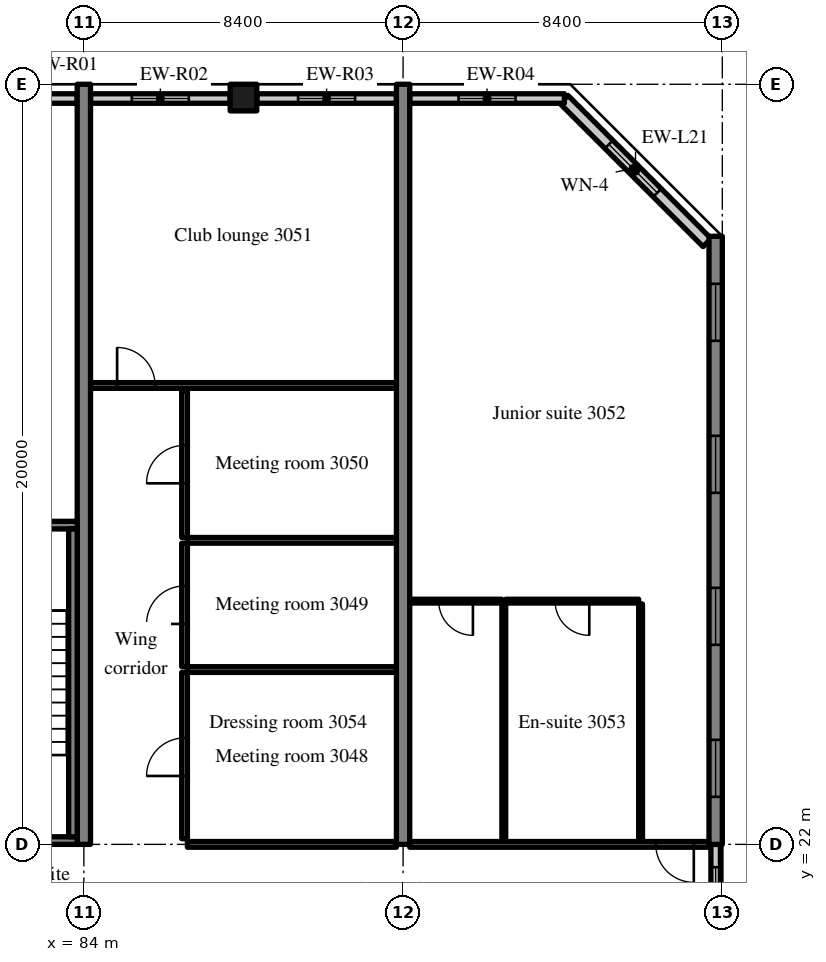
"""IFC4 building model, lengths in metres.
Left out: names, types, materials, properties, quantities, classifications, styles, units other than length and angle.
Written with IfcOpenShell. Run it as: python <this file> out.ifc"""

import sys

from ifc_helpers import new_model, si_unit, direction, frame, frame_2d, origin, origin_2d, place, context, subcontext, project, spatial, rectangle, extrude, source, transform, mapped, element, fill, save


model = new_model("IFC4")
c1 = context("Model", 3, precision=1e-05, world=origin(), true_north=direction((0.0, 1.0)))
c2 = subcontext(c1, "Body", "Model", "MODEL_VIEW")
j1 = project(units=[si_unit("LENGTHUNIT", "METRE"), si_unit("PLANEANGLEUNIT", "RADIAN")], contexts=[c1])
p1 = place(None, origin())
s1 = spatial("IfcSite", under=j1, at=p1, CompositionType="ELEMENT")
p2 = place(p1, origin())
s2 = spatial("IfcBuilding", under=s1, at=p2, CompositionType="ELEMENT")
p3 = place(p2, frame((0.0, 0.0, 125.6)))
s3 = spatial("IfcBuildingStorey", under=s2, at=p3, CompositionType="ELEMENT", Elevation=125.6)
m1 = source(origin(), c2, "Body", "SweptSolid", [
    extrude(rectangle(XDim=20.0, YDim=0.35, at=frame_2d((10.0, 0.0))), origin(), (0.0, 0.0, 1.0), 3.52),
])
for number, where, z_axis, x_axis in (
    (1, (84.0, 22.0, 0.0), (0.0, 0.0, 1.0), (0.0, 1.0, 0.0)),
    (2, (92.4, 22.0, 0.0), (0.0, 0.0, 1.0), (0.0, 1.0, 0.0)),
):
    element("IfcWall", number, at=place(p3, frame(where, z_axis=z_axis, x_axis=x_axis)), inside=s3, PredefinedType="SHEAR", context=c2, shape_type="MappedRepresentation", body=[
        mapped(m1, transform((0.0, 0.0, 0.0), scale=1.0)),
    ])
m2 = source(origin(), c2, "Body", "SweptSolid", [
    extrude(rectangle(XDim=16.0, YDim=0.35, at=frame_2d((8.0, 0.0))), origin(), (0.0, 0.0, 1.0), 3.52),
])
p4 = place(p3, frame((100.625, 22.0, 0.0), z_axis=(0.0, 0.0, 1.0), x_axis=(0.0, 1.0, 0.0)))
e3 = element("IfcWall", 3, at=p4, inside=s3, PredefinedType="SHEAR", context=c2, shape_type="MappedRepresentation", body=[
    mapped(m2, transform((0.0, 0.0, 0.0), scale=1.0)),
])
m3 = source(origin(), c2, "Body", "SweptSolid", [
    extrude(rectangle(XDim=1.5, YDim=1.5, at=frame_2d((0.75, 0.75))), frame((0.0, 0.185, 0.0), z_axis=(0.0, -1.0, 0.0), x_axis=(1.0, 0.0, 0.0)), (0.0, 0.0, 1.0), 0.37),
])
p5 = place(p4, frame((1.25, 0.0, 0.9)))
e4 = element("IfcOpeningElement", 4, at=p5, cuts=e3, PredefinedType="OPENING", context=c2, shape_type="MappedRepresentation", body=[
    mapped(m3, transform((0.0, 0.0, 0.0), scale=1.0)),
])
p6 = place(p4, frame((5.25, 0.0, 0.9)))
e5 = element("IfcOpeningElement", 5, at=p6, cuts=e3, PredefinedType="OPENING", context=c2, shape_type="MappedRepresentation", body=[
    mapped(m3, transform((0.0, 0.0, 0.0), scale=1.0)),
])
p7 = place(p4, frame((9.25, 0.0, 0.9)))
e6 = element("IfcOpeningElement", 6, at=p7, cuts=e3, PredefinedType="OPENING", context=c2, shape_type="MappedRepresentation", body=[
    mapped(m3, transform((0.0, 0.0, 0.0), scale=1.0)),
])
p8 = place(p4, frame((13.25, 0.0, 0.9)))
e7 = element("IfcOpeningElement", 7, at=p8, cuts=e3, PredefinedType="OPENING", context=c2, shape_type="MappedRepresentation", body=[
    mapped(m3, transform((0.0, 0.0, 0.0), scale=1.0)),
])
m4 = source(origin(), c2, "Body", "SweptSolid", [
    extrude(rectangle(XDim=0.7, YDim=0.7, at=origin_2d()), origin(), (0.0, 0.0, 1.0), 3.52),
])
p9 = place(p3, frame((88.2, 41.65, 0.0), z_axis=(0.0, 0.0, 1.0), x_axis=(1.0, 0.0, 0.0)))
e8 = element("IfcColumn", 8, at=p9, inside=s3, PredefinedType="COLUMN", context=c2, shape_type="MappedRepresentation", body=[
    mapped(m4, transform((0.0, 0.0, 0.0), scale=1.0)),
])
m5 = source(origin(), c2, "Body", "SweptSolid", [
    extrude(rectangle(XDim=5.326, YDim=0.3, at=frame_2d((2.663, 0.0))), origin(), (0.0, 0.0, 1.0), 3.52),
])
p10 = place(p3, frame((100.4, 37.834, 0.0), z_axis=(0.0, 0.0, 1.0), x_axis=(-0.707083859269, 0.707129702361, 0.0)))
e9 = element("IfcWall", 9, at=p10, inside=s3, PredefinedType="SOLIDWALL", context=c2, shape_type="MappedRepresentation", body=[
    mapped(m5, transform((0.0, 0.0, 0.0), scale=1.0)),
])
m6 = source(origin(), c2, "Body", "SweptSolid", [
    extrude(rectangle(XDim=1.8, YDim=1.5, at=frame_2d((0.9, 0.75))), frame((0.0, 0.16, 0.0), z_axis=(0.0, -1.0, 0.0), x_axis=(1.0, 0.0, 0.0)), (0.0, 0.0, 1.0), 0.32),
])
p11 = place(p10, frame((1.854, 0.0, 0.9)))
e10 = element("IfcOpeningElement", 10, at=p11, cuts=e9, PredefinedType="OPENING", context=c2, shape_type="MappedRepresentation", body=[
    mapped(m6, transform((0.0, 0.0, 0.0), scale=1.0)),
])
m7 = source(origin(), c2, "Body", "SweptSolid", [
    extrude(rectangle(XDim=1.683, YDim=0.25, at=frame_2d((0.841, 0.0))), origin(), (0.0, 0.0, 1.0), 2.82),
])
p12 = place(p3, frame((83.825, 41.625, 0.0), z_axis=(0.0, 0.0, 1.0), x_axis=(-1.0, 0.0, 0.0)))
e11 = element("IfcWall", 11, at=p12, inside=s3, PredefinedType="SOLIDWALL", context=c2, shape_type="MappedRepresentation", body=[
    mapped(m7, transform((0.0, 0.0, 0.0), scale=1.0)),
])
m8 = source(origin(), c2, "Body", "SweptSolid", [
    extrude(rectangle(XDim=3.675, YDim=0.25, at=frame_2d((1.837, 0.0))), origin(), (0.0, 0.0, 1.0), 2.82),
])
p13 = place(p3, frame((87.85, 41.625, 0.0), z_axis=(0.0, 0.0, 1.0), x_axis=(-1.0, 0.0, 0.0)))
e12 = element("IfcWall", 12, at=p13, inside=s3, PredefinedType="SOLIDWALL", context=c2, shape_type="MappedRepresentation", body=[
    mapped(m8, transform((0.0, 0.0, 0.0), scale=1.0)),
])
m9 = source(origin(), c2, "Body", "SweptSolid", [
    extrude(rectangle(XDim=1.5, YDim=1.5, at=frame_2d((0.75, 0.75))), frame((0.0, 0.135, 0.0), z_axis=(0.0, -1.0, 0.0), x_axis=(1.0, 0.0, 0.0)), (0.0, 0.0, 1.0), 0.27),
])
p14 = place(p13, frame((1.087, 0.0, 0.9)))
e13 = element("IfcOpeningElement", 13, at=p14, cuts=e12, PredefinedType="OPENING", context=c2, shape_type="MappedRepresentation", body=[
    mapped(m9, transform((0.0, 0.0, 0.0), scale=1.0)),
])
p15 = place(p3, frame((92.225, 41.625, 0.0), z_axis=(0.0, 0.0, 1.0), x_axis=(-1.0, 0.0, 0.0)))
e14 = element("IfcWall", 14, at=p15, inside=s3, PredefinedType="SOLIDWALL", context=c2, shape_type="MappedRepresentation", body=[
    mapped(m8, transform((0.0, 0.0, 0.0), scale=1.0)),
])
p16 = place(p15, frame((1.087, 0.0, 0.9)))
e15 = element("IfcOpeningElement", 15, at=p16, cuts=e14, PredefinedType="OPENING", context=c2, shape_type="MappedRepresentation", body=[
    mapped(m9, transform((0.0, 0.0, 0.0), scale=1.0)),
])
m10 = source(origin(), c2, "Body", "SweptSolid", [
    extrude(rectangle(XDim=4.07, YDim=0.25, at=frame_2d((2.035, 0.0))), origin(), (0.0, 0.0, 1.0), 2.82),
])
p17 = place(p3, frame((96.645, 41.625, 0.0), z_axis=(0.0, 0.0, 1.0), x_axis=(-1.0, 0.0, 0.0)))
e16 = element("IfcWall", 16, at=p17, inside=s3, PredefinedType="SOLIDWALL", context=c2, shape_type="MappedRepresentation", body=[
    mapped(m10, transform((0.0, 0.0, 0.0), scale=1.0)),
])
p18 = place(p17, frame((1.285, 0.0, 0.9)))
e17 = element("IfcOpeningElement", 17, at=p18, cuts=e16, PredefinedType="OPENING", context=c2, shape_type="MappedRepresentation", body=[
    mapped(m9, transform((0.0, 0.0, 0.0), scale=1.0)),
])
m11 = source(origin(), c2, "Body", "SweptSolid", [
    extrude(rectangle(XDim=2.4, YDim=0.25, at=frame_2d((1.2, 0.0))), origin(), (0.0, 0.0, 1.0), 2.62),
])
p19 = place(p3, frame((100.625, 19.6, 0.0), z_axis=(0.0, 0.0, 1.0), x_axis=(0.0, 1.0, 0.0)))
e18 = element("IfcWall", 18, at=p19, inside=s3, PredefinedType="SOLIDWALL", context=c2, shape_type="MappedRepresentation", body=[
    mapped(m11, transform((0.0, 0.0, 0.0), scale=1.0)),
])
m12 = source(origin(), c2, "Body", "SweptSolid", [
    extrude(rectangle(XDim=1.2, YDim=1.5, at=frame_2d((0.6, 0.75))), frame((0.0, 0.135, 0.0), z_axis=(0.0, -1.0, 0.0), x_axis=(1.0, 0.0, 0.0)), (0.0, 0.0, 1.0), 0.27),
])
p20 = place(p19, frame((0.6, 0.0, 0.9)))
e19 = element("IfcOpeningElement", 19, at=p20, cuts=e18, PredefinedType="OPENING", context=c2, shape_type="MappedRepresentation", body=[
    mapped(m12, transform((0.0, 0.0, 0.0), scale=1.0)),
])
m13 = source(origin(), c2, "Body", "SweptSolid", [
    extrude(rectangle(XDim=8.225, YDim=0.2, at=frame_2d((4.112, 0.0))), origin(), (0.0, 0.0, 1.0), 3.52),
])
p21 = place(p3, frame((83.825, 22.1, 0.0), z_axis=(0.0, 0.0, 1.0), x_axis=(-1.0, 0.0, 0.0)))
e20 = element("IfcWall", 20, at=p21, inside=s3, PredefinedType="SOLIDWALL", context=c2, shape_type="MappedRepresentation", body=[
    mapped(m13, transform((0.0, 0.0, 0.0), scale=1.0)),
])
m14 = source(origin(), c2, "Body", "SweptSolid", [
    extrude(rectangle(XDim=1.2, YDim=2.1, at=frame_2d((0.6, 1.05))), frame((0.0, 0.11, 0.0), z_axis=(0.0, -1.0, 0.0), x_axis=(1.0, 0.0, 0.0)), (0.0, 0.0, 1.0), 0.22),
])
p22 = place(p21, frame((6.025, 0.0, 0.0)))
e21 = element("IfcOpeningElement", 21, at=p22, cuts=e20, PredefinedType="OPENING", context=c2, shape_type="MappedRepresentation", body=[
    mapped(m14, transform((0.0, 0.0, 0.0), scale=1.0)),
])
p23 = place(p3, frame((83.825, 30.4, 0.0), z_axis=(0.0, 0.0, 1.0), x_axis=(-1.0, 0.0, 0.0)))
e22 = element("IfcWall", 22, at=p23, inside=s3, PredefinedType="SOLIDWALL", context=c2, shape_type="MappedRepresentation", body=[
    mapped(m13, transform((0.0, 0.0, 0.0), scale=1.0)),
])
m15 = source(origin(), c2, "Body", "SweptSolid", [
    extrude(rectangle(XDim=1.0, YDim=2.1, at=frame_2d((0.5, 1.05))), frame((0.0, 0.11, 0.0), z_axis=(0.0, -1.0, 0.0), x_axis=(1.0, 0.0, 0.0)), (0.0, 0.0, 1.0), 0.22),
])
p24 = place(p23, frame((6.125, 0.0, 0.0)))
e23 = element("IfcOpeningElement", 23, at=p24, cuts=e22, PredefinedType="OPENING", context=c2, shape_type="MappedRepresentation", body=[
    mapped(m15, transform((0.0, 0.0, 0.0), scale=1.0)),
])
m16 = source(origin(), c2, "Body", "SweptSolid", [
    extrude(rectangle(XDim=8.1, YDim=0.225, at=frame_2d((4.05, 0.0))), origin(), (0.0, 0.0, 1.0), 3.52),
])
p25 = place(p3, frame((83.713, 22.2, 0.0), z_axis=(0.0, 0.0, 1.0), x_axis=(0.0, 1.0, 0.0)))
e24 = element("IfcWall", 24, at=p25, inside=s3, PredefinedType="SOLIDWALL", context=c2, shape_type="MappedRepresentation", body=[
    mapped(m16, transform((0.0, 0.0, 0.0), scale=1.0)),
])
m17 = source(origin(), c2, "Body", "SweptSolid", [
    extrude(rectangle(XDim=5.5, YDim=0.15, at=frame_2d((2.75, 0.0))), origin(), (0.0, 0.0, 1.0), 2.82),
])
p26 = place(p3, frame((86.725, 22.0, 0.0), z_axis=(0.0, 0.0, 1.0), x_axis=(1.0, 0.0, 0.0)))
e25 = element("IfcWall", 25, at=p26, inside=s3, PredefinedType="PARTITIONING", context=c2, shape_type="MappedRepresentation", body=[
    mapped(m17, transform((0.0, 0.0, 0.0), scale=1.0)),
])
m18 = source(origin(), c2, "Body", "SweptSolid", [
    extrude(rectangle(XDim=4.375, YDim=0.15, at=frame_2d((2.188, 0.0))), origin(), (0.0, 0.0, 1.0), 3.52),
])
p27 = place(p3, frame((86.65, 22.15, 0.0), z_axis=(0.0, 0.0, 1.0), x_axis=(0.0, 1.0, 0.0)))
e26 = element("IfcWall", 26, at=p27, inside=s3, PredefinedType="PARTITIONING", context=c2, shape_type="MappedRepresentation", body=[
    mapped(m18, transform((0.0, 0.0, 0.0), scale=1.0)),
])
m19 = source(origin(), c2, "Body", "SweptSolid", [
    extrude(rectangle(XDim=1.0, YDim=2.1, at=frame_2d((0.5, 1.05))), frame((0.0, 0.085, 0.0), z_axis=(0.0, -1.0, 0.0), x_axis=(1.0, 0.0, 0.0)), (0.0, 0.0, 1.0), 0.17),
])
p28 = place(p27, frame((1.65, 0.0, 0.0)))
e27 = element("IfcOpeningElement", 27, at=p28, cuts=e26, PredefinedType="OPENING", context=c2, shape_type="MappedRepresentation", body=[
    mapped(m19, transform((0.0, 0.0, 0.0), scale=1.0)),
])
m20 = source(origin(), c2, "Body", "SweptSolid", [
    extrude(rectangle(XDim=5.5, YDim=0.15, at=frame_2d((2.75, 0.0))), origin(), (0.0, 0.0, 1.0), 3.52),
])
p29 = place(p3, frame((86.725, 26.6, 0.0), z_axis=(0.0, 0.0, 1.0), x_axis=(1.0, 0.0, 0.0)))
e28 = element("IfcWall", 28, at=p29, inside=s3, PredefinedType="PARTITIONING", context=c2, shape_type="MappedRepresentation", body=[
    mapped(m20, transform((0.0, 0.0, 0.0), scale=1.0)),
])
m21 = source(origin(), c2, "Body", "SweptSolid", [
    extrude(rectangle(XDim=3.25, YDim=0.15, at=frame_2d((1.625, 0.0))), origin(), (0.0, 0.0, 1.0), 3.52),
])
p30 = place(p3, frame((86.65, 26.675, 0.0), z_axis=(0.0, 0.0, 1.0), x_axis=(0.0, 1.0, 0.0)))
e29 = element("IfcWall", 29, at=p30, inside=s3, PredefinedType="PARTITIONING", context=c2, shape_type="MappedRepresentation", body=[
    mapped(m21, transform((0.0, 0.0, 0.0), scale=1.0)),
])
p31 = place(p30, frame((1.125, 0.0, 0.0)))
e30 = element("IfcOpeningElement", 30, at=p31, cuts=e29, PredefinedType="OPENING", context=c2, shape_type="MappedRepresentation", body=[
    mapped(m19, transform((0.0, 0.0, 0.0), scale=1.0)),
])
p32 = place(p3, frame((86.725, 30.0, 0.0), z_axis=(0.0, 0.0, 1.0), x_axis=(1.0, 0.0, 0.0)))
e31 = element("IfcWall", 31, at=p32, inside=s3, PredefinedType="PARTITIONING", context=c2, shape_type="MappedRepresentation", body=[
    mapped(m20, transform((0.0, 0.0, 0.0), scale=1.0)),
])
m22 = source(origin(), c2, "Body", "SweptSolid", [
    extrude(rectangle(XDim=3.85, YDim=0.15, at=frame_2d((1.925, 0.0))), origin(), (0.0, 0.0, 1.0), 3.52),
])
p33 = place(p3, frame((86.65, 30.075, 0.0), z_axis=(0.0, 0.0, 1.0), x_axis=(0.0, 1.0, 0.0)))
e32 = element("IfcWall", 32, at=p33, inside=s3, PredefinedType="PARTITIONING", context=c2, shape_type="MappedRepresentation", body=[
    mapped(m22, transform((0.0, 0.0, 0.0), scale=1.0)),
])
p34 = place(p33, frame((1.425, 0.0, 0.0)))
e33 = element("IfcOpeningElement", 33, at=p34, cuts=e32, PredefinedType="OPENING", context=c2, shape_type="MappedRepresentation", body=[
    mapped(m19, transform((0.0, 0.0, 0.0), scale=1.0)),
])
m23 = source(origin(), c2, "Body", "SweptSolid", [
    extrude(rectangle(XDim=8.05, YDim=0.15, at=frame_2d((4.025, 0.0))), origin(), (0.0, 0.0, 1.0), 3.52),
])
p35 = place(p3, frame((84.175, 34.075, 0.0), z_axis=(0.0, 0.0, 1.0), x_axis=(1.0, 0.0, 0.0)))
e34 = element("IfcWall", 34, at=p35, inside=s3, PredefinedType="PARTITIONING", context=c2, shape_type="MappedRepresentation", body=[
    mapped(m23, transform((0.0, 0.0, 0.0), scale=1.0)),
])
p36 = place(p35, frame((0.7, 0.0, 0.0)))
e35 = element("IfcOpeningElement", 35, at=p36, cuts=e34, PredefinedType="OPENING", context=c2, shape_type="MappedRepresentation", body=[
    mapped(m19, transform((0.0, 0.0, 0.0), scale=1.0)),
])
m24 = source(origin(), c2, "Body", "SweptSolid", [
    extrude(rectangle(XDim=6.25, YDim=0.1, at=frame_2d((3.125, 0.0))), origin(), (0.0, 0.0, 1.0), 3.52),
])
for number, where, z_axis, x_axis in (
    (36, (98.65, 22.075, 0.0), (0.0, 0.0, 1.0), (0.0, 1.0, 0.0)),
    (37, (95.05, 22.075, 0.0), (0.0, 0.0, 1.0), (0.0, 1.0, 0.0)),
):
    element("IfcWall", number, at=place(p3, frame(where, z_axis=z_axis, x_axis=x_axis)), inside=s3, PredefinedType="PARTITIONING", context=c2, shape_type="MappedRepresentation", body=[
        mapped(m24, transform((0.0, 0.0, 0.0), scale=1.0)),
    ])
m25 = source(origin(), c2, "Body", "SweptSolid", [
    extrude(rectangle(XDim=3.5, YDim=0.1, at=frame_2d((1.75, 0.0))), origin(), (0.0, 0.0, 1.0), 3.52),
])
p37 = place(p3, frame((95.1, 28.4, 0.0), z_axis=(0.0, 0.0, 1.0), x_axis=(1.0, 0.0, 0.0)))
e38 = element("IfcWall", 38, at=p37, inside=s3, PredefinedType="PARTITIONING", context=c2, shape_type="MappedRepresentation", body=[
    mapped(m25, transform((0.0, 0.0, 0.0), scale=1.0)),
])
m26 = source(origin(), c2, "Body", "SweptSolid", [
    extrude(rectangle(XDim=0.9, YDim=2.1, at=frame_2d((0.45, 1.05))), frame((0.0, 0.06, 0.0), z_axis=(0.0, -1.0, 0.0), x_axis=(1.0, 0.0, 0.0)), (0.0, 0.0, 1.0), 0.12),
])
p38 = place(p37, frame((1.3, 0.0, 0.0)))
e39 = element("IfcOpeningElement", 39, at=p38, cuts=e38, PredefinedType="OPENING", context=c2, shape_type="MappedRepresentation", body=[
    mapped(m26, transform((0.0, 0.0, 0.0), scale=1.0)),
])
m27 = source(origin(), c2, "Body", "SweptSolid", [
    extrude(rectangle(XDim=2.425, YDim=0.1, at=frame_2d((1.212, 0.0))), origin(), (0.0, 0.0, 1.0), 3.52),
])
p39 = place(p3, frame((92.575, 28.4, 0.0), z_axis=(0.0, 0.0, 1.0), x_axis=(1.0, 0.0, 0.0)))
e40 = element("IfcWall", 40, at=p39, inside=s3, PredefinedType="PARTITIONING", context=c2, shape_type="MappedRepresentation", body=[
    mapped(m27, transform((0.0, 0.0, 0.0), scale=1.0)),
])
p40 = place(p39, frame((0.763, 0.0, 0.0)))
e41 = element("IfcOpeningElement", 41, at=p40, cuts=e40, PredefinedType="OPENING", context=c2, shape_type="MappedRepresentation", body=[
    mapped(m26, transform((0.0, 0.0, 0.0), scale=1.0)),
])
m28 = source(origin(), c2, "Body", "SweptSolid", [
    extrude(rectangle(XDim=7.875, YDim=0.15, at=frame_2d((3.938, 0.0))), origin(), (0.0, 0.0, 1.0), 2.82),
])
p41 = place(p3, frame((92.575, 22.0, 0.0), z_axis=(0.0, 0.0, 1.0), x_axis=(1.0, 0.0, 0.0)))
e42 = element("IfcWall", 42, at=p41, inside=s3, PredefinedType="PARTITIONING", context=c2, shape_type="MappedRepresentation", body=[
    mapped(m28, transform((0.0, 0.0, 0.0), scale=1.0)),
])
p42 = place(p41, frame((6.475, 0.0, 0.0)))
e43 = element("IfcOpeningElement", 43, at=p42, cuts=e42, PredefinedType="OPENING", context=c2, shape_type="MappedRepresentation", body=[
    mapped(m19, transform((0.0, 0.0, 0.0), scale=1.0)),
])
m29 = source(origin(), c2, "Body", "SweptSolid", [
    extrude(rectangle(XDim=1.8, YDim=1.5, at=frame_2d((0.9, 0.75))), frame((0.0, 0.03, 0.0), z_axis=(0.0, -1.0, 0.0), x_axis=(1.0, 0.0, 0.0)), (0.0, 0.0, 1.0), 0.06),
])
p43 = place(p11, origin())
e44 = element("IfcWindow", 44, at=p43, inside=s3, PartitioningType="SINGLE_PANEL", PredefinedType="WINDOW", context=c2, shape_type="MappedRepresentation", body=[
    mapped(m29, transform((0.0, 0.0, 0.0), scale=1.0)),
])
fill(e10, e44)
m30 = source(origin(), c2, "Body", "SweptSolid", [
    extrude(rectangle(XDim=1.5, YDim=1.5, at=frame_2d((0.75, 0.75))), frame((0.0, 0.03, 0.0), z_axis=(0.0, -1.0, 0.0), x_axis=(1.0, 0.0, 0.0)), (0.0, 0.0, 1.0), 0.06),
])
p44 = place(p14, origin())
e45 = element("IfcWindow", 45, at=p44, inside=s3, PartitioningType="SINGLE_PANEL", PredefinedType="WINDOW", context=c2, shape_type="MappedRepresentation", body=[
    mapped(m30, transform((0.0, 0.0, 0.0), scale=1.0)),
])
fill(e13, e45)
p45 = place(p16, origin())
e46 = element("IfcWindow", 46, at=p45, inside=s3, PartitioningType="SINGLE_PANEL", PredefinedType="WINDOW", context=c2, shape_type="MappedRepresentation", body=[
    mapped(m30, transform((0.0, 0.0, 0.0), scale=1.0)),
])
fill(e15, e46)
p46 = place(p18, origin())
e47 = element("IfcWindow", 47, at=p46, inside=s3, PartitioningType="SINGLE_PANEL", PredefinedType="WINDOW", context=c2, shape_type="MappedRepresentation", body=[
    mapped(m30, transform((0.0, 0.0, 0.0), scale=1.0)),
])
fill(e17, e47)
p47 = place(p5, origin())
e48 = element("IfcWindow", 48, at=p47, inside=s3, PartitioningType="SINGLE_PANEL", PredefinedType="WINDOW", context=c2, shape_type="MappedRepresentation", body=[
    mapped(m30, transform((0.0, 0.0, 0.0), scale=1.0)),
])
fill(e4, e48)
p48 = place(p6, origin())
e49 = element("IfcWindow", 49, at=p48, inside=s3, PartitioningType="SINGLE_PANEL", PredefinedType="WINDOW", context=c2, shape_type="MappedRepresentation", body=[
    mapped(m30, transform((0.0, 0.0, 0.0), scale=1.0)),
])
fill(e5, e49)
p49 = place(p7, origin())
e50 = element("IfcWindow", 50, at=p49, inside=s3, PartitioningType="SINGLE_PANEL", PredefinedType="WINDOW", context=c2, shape_type="MappedRepresentation", body=[
    mapped(m30, transform((0.0, 0.0, 0.0), scale=1.0)),
])
fill(e6, e50)
p50 = place(p8, origin())
e51 = element("IfcWindow", 51, at=p50, inside=s3, PartitioningType="SINGLE_PANEL", PredefinedType="WINDOW", context=c2, shape_type="MappedRepresentation", body=[
    mapped(m30, transform((0.0, 0.0, 0.0), scale=1.0)),
])
fill(e7, e51)
m31 = source(origin(), c2, "Body", "SweptSolid", [
    extrude(rectangle(XDim=1.2, YDim=1.5, at=frame_2d((0.6, 0.75))), frame((0.0, 0.03, 0.0), z_axis=(0.0, -1.0, 0.0), x_axis=(1.0, 0.0, 0.0)), (0.0, 0.0, 1.0), 0.06),
])
p51 = place(p20, origin())
e52 = element("IfcWindow", 52, at=p51, inside=s3, PartitioningType="SINGLE_PANEL", PredefinedType="WINDOW", context=c2, shape_type="MappedRepresentation", body=[
    mapped(m31, transform((0.0, 0.0, 0.0), scale=1.0)),
])
fill(e19, e52)
m32 = source(origin(), c2, "Body", "SweptSolid", [
    extrude(rectangle(XDim=1.0, YDim=2.1, at=frame_2d((0.5, 1.05))), frame((0.0, 0.025, 0.0), z_axis=(0.0, -1.0, 0.0), x_axis=(1.0, 0.0, 0.0)), (0.0, 0.0, 1.0), 0.05),
])
p52 = place(p28, origin())
e53 = element("IfcDoor", 53, at=p52, inside=s3, OperationType="SINGLE_SWING_LEFT", PredefinedType="DOOR", context=c2, shape_type="MappedRepresentation", body=[
    mapped(m32, transform((0.0, 0.0, 0.0), scale=1.0)),
])
fill(e27, e53)
p53 = place(p31, origin())
e54 = element("IfcDoor", 54, at=p53, inside=s3, OperationType="SINGLE_SWING_LEFT", PredefinedType="DOOR", context=c2, shape_type="MappedRepresentation", body=[
    mapped(m32, transform((0.0, 0.0, 0.0), scale=1.0)),
])
fill(e30, e54)
p54 = place(p34, origin())
e55 = element("IfcDoor", 55, at=p54, inside=s3, OperationType="SINGLE_SWING_LEFT", PredefinedType="DOOR", context=c2, shape_type="MappedRepresentation", body=[
    mapped(m32, transform((0.0, 0.0, 0.0), scale=1.0)),
])
fill(e33, e55)
p55 = place(p36, origin())
e56 = element("IfcDoor", 56, at=p55, inside=s3, OperationType="SINGLE_SWING_LEFT", PredefinedType="DOOR", context=c2, shape_type="MappedRepresentation", body=[
    mapped(m32, transform((0.0, 0.0, 0.0), scale=1.0)),
])
fill(e35, e56)
m33 = source(origin(), c2, "Body", "SweptSolid", [
    extrude(rectangle(XDim=0.9, YDim=2.1, at=frame_2d((0.45, 1.05))), frame((0.0, 0.025, 0.0), z_axis=(0.0, -1.0, 0.0), x_axis=(1.0, 0.0, 0.0)), (0.0, 0.0, 1.0), 0.05),
])
p56 = place(p38, origin())
e57 = element("IfcDoor", 57, at=p56, inside=s3, OperationType="SINGLE_SWING_RIGHT", PredefinedType="DOOR", context=c2, shape_type="MappedRepresentation", body=[
    mapped(m33, transform((0.0, 0.0, 0.0), scale=1.0)),
])
fill(e39, e57)
p57 = place(p40, origin())
e58 = element("IfcDoor", 58, at=p57, inside=s3, OperationType="SINGLE_SWING_RIGHT", PredefinedType="DOOR", context=c2, shape_type="MappedRepresentation", body=[
    mapped(m33, transform((0.0, 0.0, 0.0), scale=1.0)),
])
fill(e41, e58)
p58 = place(p42, origin())
e59 = element("IfcDoor", 59, at=p58, inside=s3, OperationType="SINGLE_SWING_RIGHT", PredefinedType="DOOR", context=c2, shape_type="MappedRepresentation", body=[
    mapped(m32, transform((0.0, 0.0, 0.0), scale=1.0)),
])
fill(e43, e59)
save(model, sys.argv[1])
